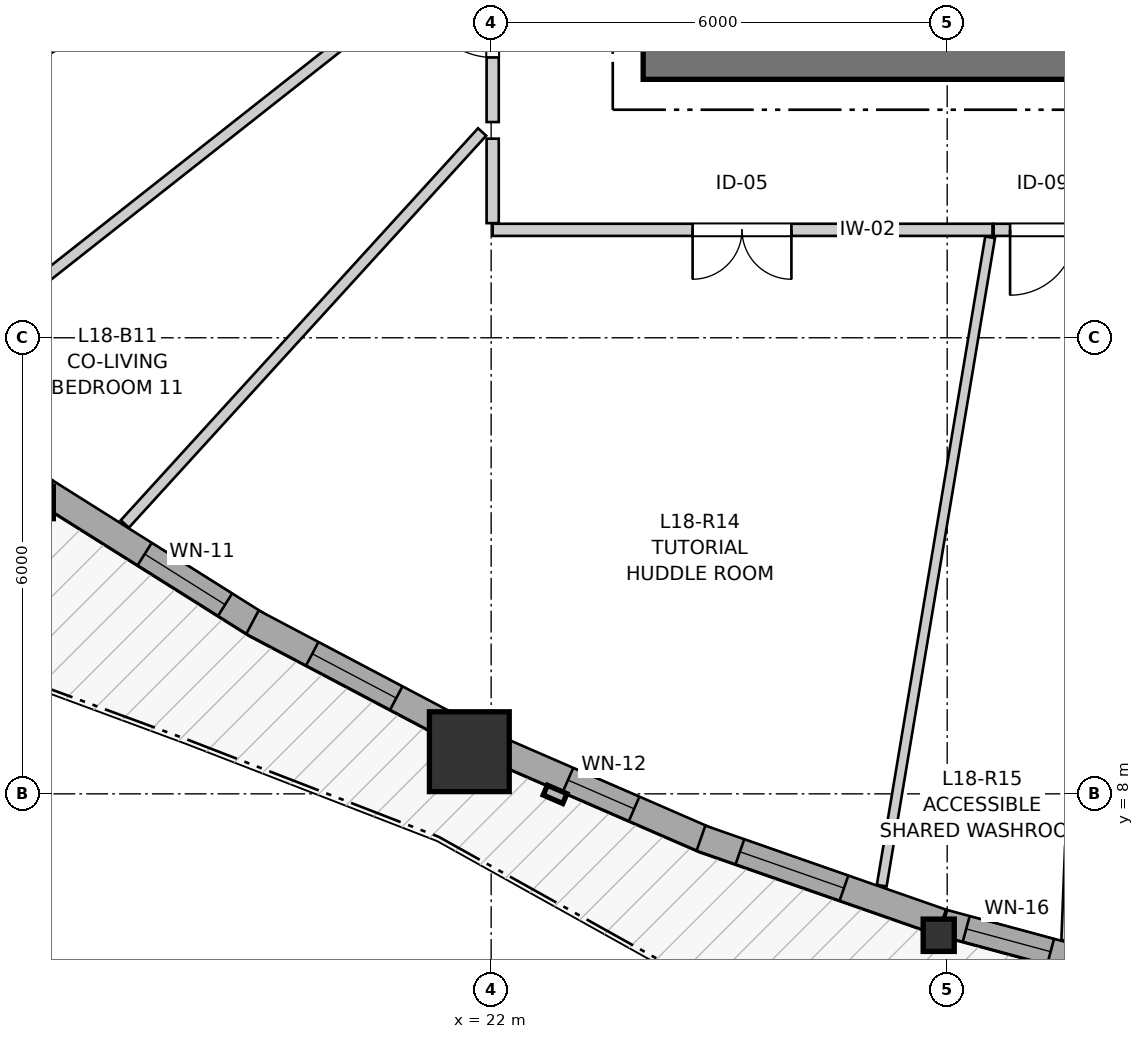
"""IFC4 building model, lengths in metres.
Left out: names, types, materials, properties, quantities, classifications, styles, units other than length and angle.
Written with IfcOpenShell. Run it as: python <this file> out.ifc"""

import sys

from ifc_helpers import new_model, si_unit, direction, frame, frame_2d, origin, origin_2d, place, context, subcontext, project, spatial, rectangle, i_section, extrude, source, transform, mapped, element, fill, save


model = new_model("IFC4")
c1 = context("Model", 3, precision=1e-05, world=origin(), true_north=direction((0.0, 1.0)))
c2 = subcontext(c1, "Body", "Model", "MODEL_VIEW")
j1 = project(units=[si_unit("LENGTHUNIT", "METRE"), si_unit("PLANEANGLEUNIT", "RADIAN")], contexts=[c1])
p1 = place(None, origin())
s1 = spatial("IfcSite", under=j1, at=p1, CompositionType="ELEMENT")
p2 = place(p1, origin())
s2 = spatial("IfcBuilding", under=s1, at=p2, CompositionType="ELEMENT")
p3 = place(p2, frame((0.0, 0.0, 62.2)))
s3 = spatial("IfcBuildingStorey", under=s2, at=p3, CompositionType="ELEMENT", Elevation=62.2)
p4 = place(p3, frame((24.0, 17.8, 0.0), z_axis=(0.0, 0.0, 1.0), x_axis=(1.0, 0.0, 0.0)))
e1 = element("IfcWall", 1, at=p4, inside=s3, PredefinedType="SHEAR", context=c2, shape_type="SweptSolid", body=[
    extrude(rectangle(XDim=12.7, YDim=0.8, at=frame_2d((6.35, 0.0))), origin(), (0.0, 0.0, 1.0), 2.9),
])
m1 = source(origin(), c2, "Body", "SweptSolid", [
    extrude(i_section(OverallWidth=0.409, OverallDepth=0.425, WebThickness=0.03, FlangeThickness=0.048, FilletRadius=0.015, at=origin_2d()), origin(), (0.0, 0.0, 1.0), 2.9),
])
p5 = place(p3, frame((16.035, 11.832, 0.0), z_axis=(0.0, 0.0, 1.0), x_axis=(1.0, 0.0, 0.0)))
e2 = element("IfcColumn", 2, at=p5, inside=s3, PredefinedType="PILASTER", context=c2, shape_type="MappedRepresentation", body=[
    mapped(m1, transform((0.0, 0.0, 0.0), x_axis=(1.0, 0.0, 0.0), y_axis=(0.0, 1.0, 0.0), z_axis=(0.0, 0.0, 1.0), scale=1.0)),
])
m2 = source(origin(), c2, "Body", "SweptSolid", [
    extrude(rectangle(XDim=1.05, YDim=1.05, at=origin_2d()), origin(), (0.0, 0.0, 1.0), 2.9),
])
p6 = place(p3, frame((21.713, 8.554, 0.0), z_axis=(0.0, 0.0, 1.0), x_axis=(1.0, 0.0, 0.0)))
e3 = element("IfcColumn", 3, at=p6, inside=s3, PredefinedType="COLUMN", context=c2, shape_type="MappedRepresentation", body=[
    mapped(m2, transform((0.0, 0.0, 0.0), x_axis=(1.0, 0.0, 0.0), y_axis=(0.0, 1.0, 0.0), z_axis=(0.0, 0.0, 1.0), scale=1.0)),
])
p7 = place(p3, frame((27.888, 6.139, 0.0), z_axis=(0.0, 0.0, 1.0), x_axis=(1.0, 0.0, 0.0)))
e4 = element("IfcColumn", 4, at=p7, inside=s3, PredefinedType="PILASTER", context=c2, shape_type="MappedRepresentation", body=[
    mapped(m1, transform((0.0, 0.0, 0.0), x_axis=(1.0, 0.0, 0.0), y_axis=(0.0, 1.0, 0.0), z_axis=(0.0, 0.0, 1.0), scale=1.0)),
])
p8 = place(p3, frame((13.457, 13.958, 0.0), z_axis=(0.0, 0.0, 1.0), x_axis=(0.803790514758, -0.594912437578, 0.0)))
e5 = element("IfcWall", 5, at=p8, inside=s3, PredefinedType="SOLIDWALL", context=c2, shape_type="SweptSolid", body=[
    extrude(rectangle(XDim=3.317, YDim=0.35, at=frame_2d((1.659, 0.0))), origin(), (0.0, 0.0, 1.0), 2.38),
])
p9 = place(p8, frame((1.468, 0.0, 0.82)))
e6 = element("IfcOpeningElement", 6, at=p9, cuts=e5, PredefinedType="OPENING", context=c2, shape_type="SweptSolid", body=[
    extrude(rectangle(XDim=1.4, YDim=1.35, at=frame_2d((0.7, 0.675))), frame((0.0, 0.185, 0.0), z_axis=(0.0, -1.0, 0.0), x_axis=(1.0, 0.0, 0.0)), (0.0, 0.0, 1.0), 0.37),
])
p10 = place(p3, frame((16.146, 11.97, 0.0), z_axis=(0.0, 0.0, 1.0), x_axis=(0.846405860611, -0.532538373381, 0.0)))
e7 = element("IfcWall", 7, at=p10, inside=s3, PredefinedType="SOLIDWALL", context=c2, shape_type="SweptSolid", body=[
    extrude(rectangle(XDim=3.298, YDim=0.35, at=frame_2d((1.649, 0.0))), origin(), (0.0, 0.0, 1.0), 2.38),
])
p11 = place(p10, frame((1.531, 0.0, 0.82)))
e8 = element("IfcOpeningElement", 8, at=p11, cuts=e7, PredefinedType="OPENING", context=c2, shape_type="SweptSolid", body=[
    extrude(rectangle(XDim=1.25, YDim=1.35, at=frame_2d((0.625, 0.675))), frame((0.0, 0.185, 0.0), z_axis=(0.0, -1.0, 0.0), x_axis=(1.0, 0.0, 0.0)), (0.0, 0.0, 1.0), 0.37),
])
p12 = place(p3, frame((18.86, 10.258, 0.0), z_axis=(0.0, 0.0, 1.0), x_axis=(0.884375478211, -0.46677619213, 0.0)))
e9 = element("IfcWall", 9, at=p12, inside=s3, PredefinedType="SOLIDWALL", context=c2, shape_type="SweptSolid", body=[
    extrude(rectangle(XDim=3.019, YDim=0.35, at=frame_2d((1.509, 0.0))), origin(), (0.0, 0.0, 1.0), 2.38),
])
p13 = place(p12, frame((0.889, 0.0, 0.82)))
e10 = element("IfcOpeningElement", 10, at=p13, cuts=e9, PredefinedType="OPENING", context=c2, shape_type="SweptSolid", body=[
    extrude(rectangle(XDim=1.25, YDim=1.35, at=frame_2d((0.625, 0.675))), frame((0.0, 0.185, 0.0), z_axis=(0.0, -1.0, 0.0), x_axis=(1.0, 0.0, 0.0)), (0.0, 0.0, 1.0), 0.37),
])
p14 = place(p3, frame((22.058, 8.595, 0.0), z_axis=(0.0, 0.0, 1.0), x_axis=(0.917112224483, -0.398629110458, 0.0)))
e11 = element("IfcWall", 11, at=p14, inside=s3, PredefinedType="SOLIDWALL", context=c2, shape_type="SweptSolid", body=[
    extrude(rectangle(XDim=3.037, YDim=0.35, at=frame_2d((1.519, 0.0))), origin(), (0.0, 0.0, 1.0), 2.38),
])
p15 = place(p14, frame((1.039, 0.0, 0.82)))
e12 = element("IfcOpeningElement", 12, at=p15, cuts=e11, PredefinedType="OPENING", context=c2, shape_type="SweptSolid", body=[
    extrude(rectangle(XDim=0.95, YDim=1.35, at=frame_2d((0.475, 0.675))), frame((0.0, 0.185, 0.0), z_axis=(0.0, -1.0, 0.0), x_axis=(1.0, 0.0, 0.0)), (0.0, 0.0, 1.0), 0.37),
])
p16 = place(p3, frame((24.76, 7.417, 0.0), z_axis=(0.0, 0.0, 1.0), x_axis=(0.944134890247, -0.329559264804, 0.0)))
e13 = element("IfcWall", 13, at=p16, inside=s3, PredefinedType="SOLIDWALL", context=c2, shape_type="SweptSolid", body=[
    extrude(rectangle(XDim=3.354, YDim=0.35, at=frame_2d((1.677, 0.0))), origin(), (0.0, 0.0, 1.0), 2.38),
])
p17 = place(p16, frame((0.543, 0.0, 0.82)))
e14 = element("IfcOpeningElement", 14, at=p17, cuts=e13, PredefinedType="OPENING", context=c2, shape_type="SweptSolid", body=[
    extrude(rectangle(XDim=1.45, YDim=1.25, at=frame_2d((0.725, 0.625))), frame((0.0, 0.185, 0.0), z_axis=(0.0, -1.0, 0.0), x_axis=(1.0, 0.0, 0.0)), (0.0, 0.0, 1.0), 0.37),
])
p18 = place(p3, frame((27.953, 6.303, 0.0), z_axis=(0.0, 0.0, 1.0), x_axis=(0.965464207527, -0.260535724968, 0.0)))
e15 = element("IfcWall", 15, at=p18, inside=s3, PredefinedType="SOLIDWALL", context=c2, shape_type="SweptSolid", body=[
    extrude(rectangle(XDim=3.41, YDim=0.35, at=frame_2d((1.705, 0.0))), origin(), (0.0, 0.0, 1.0), 2.38),
])
p19 = place(p18, frame((0.308, 0.0, 0.82)))
e16 = element("IfcOpeningElement", 16, at=p19, cuts=e15, PredefinedType="OPENING", context=c2, shape_type="SweptSolid", body=[
    extrude(rectangle(XDim=1.15, YDim=1.2, at=frame_2d((0.575, 0.6))), frame((0.0, 0.185, 0.0), z_axis=(0.0, -1.0, 0.0), x_axis=(1.0, 0.0, 0.0)), (0.0, 0.0, 1.0), 0.37),
])
p20 = place(p18, frame((1.853, 0.0, 0.82)))
e17 = element("IfcOpeningElement", 17, at=p20, cuts=e15, PredefinedType="OPENING", context=c2, shape_type="SweptSolid", body=[
    extrude(rectangle(XDim=1.25, YDim=1.35, at=frame_2d((0.625, 0.675))), frame((0.0, 0.185, 0.0), z_axis=(0.0, -1.0, 0.0), x_axis=(1.0, 0.0, 0.0)), (0.0, 0.0, 1.0), 0.37),
])
p21 = place(p3, frame((28.596, 15.42, 0.0), z_axis=(0.0, 0.0, 1.0), x_axis=(-1.0, 0.0, 0.0)))
e18 = element("IfcWall", 18, at=p21, inside=s3, PredefinedType="PARTITIONING", context=c2, shape_type="SweptSolid", body=[
    extrude(rectangle(XDim=6.576, YDim=0.16, at=frame_2d((3.288, 0.0))), origin(), (0.0, 0.0, 1.0), 2.9),
])
p22 = place(p21, frame((2.646, 0.0, 0.0)))
e19 = element("IfcOpeningElement", 19, at=p22, cuts=e18, PredefinedType="OPENING", context=c2, shape_type="SweptSolid", body=[
    extrude(rectangle(XDim=1.3, YDim=2.1, at=frame_2d((0.65, 1.05))), frame((0.0, 0.09, 0.0), z_axis=(0.0, -1.0, 0.0), x_axis=(1.0, 0.0, 0.0)), (0.0, 0.0, 1.0), 0.18),
])
p23 = place(p3, frame((22.02, 16.838, 0.0), z_axis=(0.0, 0.0, 1.0), x_axis=(0.0, 1.0, 0.0)))
e20 = element("IfcWall", 20, at=p23, inside=s3, PredefinedType="PARTITIONING", context=c2, shape_type="SweptSolid", body=[
    extrude(rectangle(XDim=2.618, YDim=0.16, at=frame_2d((1.309, 0.0))), origin(), (0.0, 0.0, 1.0), 2.9),
])
p24 = place(p23, frame((0.85, 0.0, 0.0)))
e21 = element("IfcOpeningElement", 21, at=p24, cuts=e20, PredefinedType="OPENING", context=c2, shape_type="SweptSolid", body=[
    extrude(rectangle(XDim=0.92, YDim=2.1, at=frame_2d((0.46, 1.05))), frame((0.0, 0.09, 0.0), z_axis=(0.0, -1.0, 0.0), x_axis=(1.0, 0.0, 0.0)), (0.0, 0.0, 1.0), 0.18),
])
p25 = place(p3, frame((29.949, 15.42, 0.0), z_axis=(0.0, 0.0, 1.0), x_axis=(-1.0, 0.0, 0.0)))
e22 = element("IfcWall", 22, at=p25, inside=s3, PredefinedType="PARTITIONING", context=c2, shape_type="SweptSolid", body=[
    extrude(rectangle(XDim=1.338, YDim=0.16, at=frame_2d((0.669, 0.0))), origin(), (0.0, 0.0, 1.0), 2.9),
])
p26 = place(p25, frame((0.261, 0.0, 0.0)))
e23 = element("IfcOpeningElement", 23, at=p26, cuts=e22, PredefinedType="OPENING", context=c2, shape_type="SweptSolid", body=[
    extrude(rectangle(XDim=0.86, YDim=2.05, at=frame_2d((0.43, 1.025))), frame((0.0, 0.09, 0.0), z_axis=(0.0, -1.0, 0.0), x_axis=(1.0, 0.0, 0.0)), (0.0, 0.0, 1.0), 0.18),
])
p27 = place(p3, frame((12.049, 15.422, 0.0), z_axis=(0.0, 0.0, 1.0), x_axis=(0.865775806306, 0.500432066534, 0.0)))
e24 = element("IfcWall", 24, at=p27, inside=s3, PredefinedType="PARTITIONING", context=c2, shape_type="SweptSolid", body=[
    extrude(rectangle(XDim=11.375, YDim=0.145, at=frame_2d((5.688, 0.0))), origin(), (0.0, 0.0, 1.0), 2.9),
])
p28 = place(p3, frame((14.452, 13.473, 0.0), z_axis=(0.0, 0.0, 1.0), x_axis=(0.785461283481, 0.618910794988, 0.0)))
e25 = element("IfcWall", 25, at=p28, inside=s3, PredefinedType="PARTITIONING", context=c2, shape_type="SweptSolid", body=[
    extrude(rectangle(XDim=9.468, YDim=0.145, at=frame_2d((4.734, 0.0))), origin(), (0.0, 0.0, 1.0), 2.9),
])
p29 = place(p3, frame((29.567, 6.072, 0.0), z_axis=(0.0, 0.0, 1.0), x_axis=(0.039185050788, 0.999231970963, 0.0)))
e26 = element("IfcWall", 26, at=p29, inside=s3, PredefinedType="PARTITIONING", context=c2, shape_type="SweptSolid", body=[
    extrude(rectangle(XDim=9.265, YDim=0.13, at=frame_2d((4.632, 0.0))), origin(), (0.0, 0.0, 1.0), 2.9),
])
p30 = place(p3, frame((27.139, 6.792, 0.0), z_axis=(0.0, 0.0, 1.0), x_axis=(0.164847632872, 0.986319044699, 0.0)))
e27 = element("IfcWall", 27, at=p30, inside=s3, PredefinedType="PARTITIONING", context=c2, shape_type="SweptSolid", body=[
    extrude(rectangle(XDim=8.648, YDim=0.13, at=frame_2d((4.324, 0.0))), origin(), (0.0, 0.0, 1.0), 2.9),
])
p31 = place(p3, frame((17.18, 11.55, 0.0), z_axis=(0.0, 0.0, 1.0), x_axis=(0.673657773225, 0.739043438895, 0.0)))
e28 = element("IfcWall", 28, at=p31, inside=s3, PredefinedType="PARTITIONING", context=c2, shape_type="SweptSolid", body=[
    extrude(rectangle(XDim=6.979, YDim=0.145, at=frame_2d((3.489, 0.0))), origin(), (0.0, 0.0, 1.0), 2.9),
])
p32 = place(p3, frame((22.02, 15.508, 0.0), z_axis=(0.0, 0.0, 1.0), x_axis=(0.0, 1.0, 0.0)))
e29 = element("IfcWall", 29, at=p32, inside=s3, PredefinedType="PARTITIONING", context=c2, shape_type="SweptSolid", body=[
    extrude(rectangle(XDim=1.112, YDim=0.16, at=frame_2d((0.556, 0.0))), origin(), (0.0, 0.0, 1.0), 2.9),
])
m3 = source(origin(), c2, "Body", "SweptSolid", [
    extrude(rectangle(XDim=1.25, YDim=1.35, at=frame_2d((0.625, 0.675))), frame((0.0, 0.03, 0.0), z_axis=(0.0, -1.0, 0.0), x_axis=(1.0, 0.0, 0.0)), (0.0, 0.0, 1.0), 0.06),
])
p33 = place(p11, origin())
e30 = element("IfcWindow", 30, at=p33, inside=s3, PartitioningType="SINGLE_PANEL", PredefinedType="WINDOW", context=c2, shape_type="MappedRepresentation", body=[
    mapped(m3, transform((0.0, 0.0, 0.0), x_axis=(1.0, 0.0, 0.0), y_axis=(0.0, 1.0, 0.0), z_axis=(0.0, 0.0, 1.0), scale=1.0)),
])
fill(e8, e30)
p34 = place(p13, origin())
e31 = element("IfcWindow", 31, at=p34, inside=s3, PartitioningType="SINGLE_PANEL", PredefinedType="WINDOW", context=c2, shape_type="MappedRepresentation", body=[
    mapped(m3, transform((0.0, 0.0, 0.0), x_axis=(1.0, 0.0, 0.0), y_axis=(0.0, 1.0, 0.0), z_axis=(0.0, 0.0, 1.0), scale=1.0)),
])
fill(e10, e31)
m4 = source(origin(), c2, "Body", "SweptSolid", [
    extrude(rectangle(XDim=0.95, YDim=1.35, at=frame_2d((0.475, 0.675))), frame((0.0, 0.03, 0.0), z_axis=(0.0, -1.0, 0.0), x_axis=(1.0, 0.0, 0.0)), (0.0, 0.0, 1.0), 0.06),
])
p35 = place(p15, origin())
e32 = element("IfcWindow", 32, at=p35, inside=s3, PartitioningType="SINGLE_PANEL", PredefinedType="WINDOW", context=c2, shape_type="MappedRepresentation", body=[
    mapped(m4, transform((0.0, 0.0, 0.0), x_axis=(1.0, 0.0, 0.0), y_axis=(0.0, 1.0, 0.0), z_axis=(0.0, 0.0, 1.0), scale=1.0)),
])
fill(e12, e32)
m5 = source(origin(), c2, "Body", "SweptSolid", [
    extrude(rectangle(XDim=1.45, YDim=1.25, at=frame_2d((0.725, 0.625))), frame((0.0, 0.03, 0.0), z_axis=(0.0, -1.0, 0.0), x_axis=(1.0, 0.0, 0.0)), (0.0, 0.0, 1.0), 0.06),
])
p36 = place(p17, origin())
e33 = element("IfcWindow", 33, at=p36, inside=s3, PartitioningType="SINGLE_PANEL", PredefinedType="WINDOW", context=c2, shape_type="MappedRepresentation", body=[
    mapped(m5, transform((0.0, 0.0, 0.0), x_axis=(1.0, 0.0, 0.0), y_axis=(0.0, 1.0, 0.0), z_axis=(0.0, 0.0, 1.0), scale=1.0)),
])
fill(e14, e33)
m6 = source(origin(), c2, "Body", "SweptSolid", [
    extrude(rectangle(XDim=1.15, YDim=1.2, at=frame_2d((0.575, 0.6))), frame((0.0, 0.03, 0.0), z_axis=(0.0, -1.0, 0.0), x_axis=(1.0, 0.0, 0.0)), (0.0, 0.0, 1.0), 0.06),
])
p37 = place(p19, origin())
e34 = element("IfcWindow", 34, at=p37, inside=s3, PartitioningType="SINGLE_PANEL", PredefinedType="WINDOW", context=c2, shape_type="MappedRepresentation", body=[
    mapped(m6, transform((0.0, 0.0, 0.0), x_axis=(1.0, 0.0, 0.0), y_axis=(0.0, 1.0, 0.0), z_axis=(0.0, 0.0, 1.0), scale=1.0)),
])
fill(e16, e34)
m7 = source(origin(), c2, "Body", "SweptSolid", [
    extrude(rectangle(XDim=1.3, YDim=2.1, at=frame_2d((0.65, 1.05))), frame((0.0, 0.025, 0.0), z_axis=(0.0, -1.0, 0.0), x_axis=(1.0, 0.0, 0.0)), (0.0, 0.0, 1.0), 0.05),
])
p38 = place(p22, origin())
e35 = element("IfcDoor", 35, at=p38, inside=s3, OperationType="DOUBLE_DOOR_SINGLE_SWING", PredefinedType="DOOR", context=c2, shape_type="MappedRepresentation", body=[
    mapped(m7, transform((0.0, 0.0, 0.0), x_axis=(1.0, 0.0, 0.0), y_axis=(0.0, 1.0, 0.0), z_axis=(0.0, 0.0, 1.0), scale=1.0)),
])
fill(e19, e35)
m8 = source(origin(), c2, "Body", "SweptSolid", [
    extrude(rectangle(XDim=0.92, YDim=2.1, at=frame_2d((0.46, 1.05))), frame((0.0, 0.025, 0.0), z_axis=(0.0, -1.0, 0.0), x_axis=(1.0, 0.0, 0.0)), (0.0, 0.0, 1.0), 0.05),
])
p39 = place(p24, origin())
e36 = element("IfcDoor", 36, at=p39, inside=s3, OperationType="SINGLE_SWING_RIGHT", PredefinedType="DOOR", context=c2, shape_type="MappedRepresentation", body=[
    mapped(m8, transform((0.0, 0.0, 0.0), x_axis=(1.0, 0.0, 0.0), y_axis=(0.0, 1.0, 0.0), z_axis=(0.0, 0.0, 1.0), scale=1.0)),
])
fill(e21, e36)
m9 = source(origin(), c2, "Body", "SweptSolid", [
    extrude(rectangle(XDim=0.86, YDim=2.05, at=frame_2d((0.43, 1.025))), frame((0.0, 0.025, 0.0), z_axis=(0.0, -1.0, 0.0), x_axis=(1.0, 0.0, 0.0)), (0.0, 0.0, 1.0), 0.05),
])
p40 = place(p26, origin())
e37 = element("IfcDoor", 37, at=p40, inside=s3, OperationType="SINGLE_SWING_RIGHT", PredefinedType="DOOR", context=c2, shape_type="MappedRepresentation", body=[
    mapped(m9, transform((0.0, 0.0, 0.0), x_axis=(1.0, 0.0, 0.0), y_axis=(0.0, 1.0, 0.0), z_axis=(0.0, 0.0, 1.0), scale=1.0)),
])
fill(e23, e37)
save(model, sys.argv[1])
